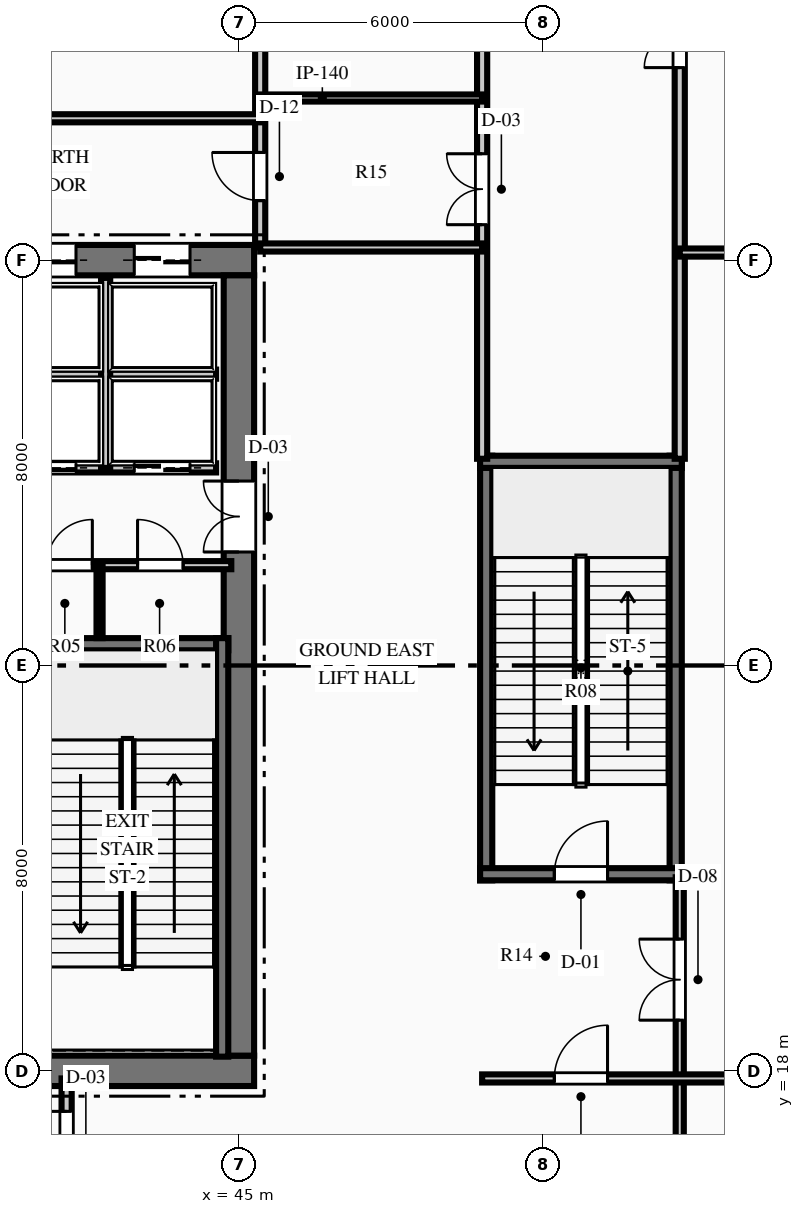
"""IFC4 building model, lengths in metres.
Left out: names, types, materials, properties, quantities, classifications, styles, units other than length and angle.
Written with IfcOpenShell. Run it as: python <this file> out.ifc"""

import sys

from ifc_helpers import new_model, si_unit, direction, frame, frame_2d, origin, place, context, subcontext, project, spatial, rectangle, extrude, element, fill, save


model = new_model("IFC4")
c1 = context("Model", 3, precision=1e-05, world=origin(), true_north=direction((0.0, 1.0)))
c2 = subcontext(c1, "Body", "Model", "MODEL_VIEW")
j1 = project(units=[si_unit("LENGTHUNIT", "METRE"), si_unit("PLANEANGLEUNIT", "RADIAN")], contexts=[c1])
p1 = place(None, origin())
s1 = spatial("IfcSite", under=j1, at=p1, CompositionType="ELEMENT")
p2 = place(p1, origin())
s2 = spatial("IfcBuilding", under=s1, at=p2, CompositionType="ELEMENT")
p3 = place(p2, origin())
s3 = spatial("IfcBuildingStorey", under=s2, at=p3, CompositionType="ELEMENT", Elevation=0.0)
p4 = place(p3, frame((26.7, 18.0, 0.0), z_axis=(0.0, 0.0, 1.0), x_axis=(1.0, 0.0, 0.0)))
e1 = element("IfcWall", 1, at=p4, inside=s3, PredefinedType="SHEAR", context=c2, shape_type="SweptSolid", body=[
    extrude(rectangle(XDim=18.6, YDim=0.6, at=frame_2d((9.3, 0.0))), origin(), (0.0, 0.0, 1.0), 6.0),
])
p5 = place(p4, frame((7.4, 0.0, 0.0)))
e2 = element("IfcOpeningElement", 2, at=p5, cuts=e1, PredefinedType="OPENING", context=c2, shape_type="SweptSolid", body=[
    extrude(rectangle(XDim=1.1, YDim=2.15, at=frame_2d((0.55, 1.075))), frame((0.0, 0.31, 0.0), z_axis=(0.0, -1.0, 0.0), x_axis=(1.0, 0.0, 0.0)), (0.0, 0.0, 1.0), 0.62),
])
p6 = place(p4, frame((10.1, 0.0, 0.0)))
e3 = element("IfcOpeningElement", 3, at=p6, cuts=e1, PredefinedType="OPENING", context=c2, shape_type="SweptSolid", body=[
    extrude(rectangle(XDim=1.1, YDim=2.15, at=frame_2d((0.55, 1.075))), frame((0.0, 0.31, 0.0), z_axis=(0.0, -1.0, 0.0), x_axis=(1.0, 0.0, 0.0)), (0.0, 0.0, 1.0), 0.62),
])
p7 = place(p3, frame((26.7, 34.0, 0.0), z_axis=(0.0, 0.0, 1.0), x_axis=(1.0, 0.0, 0.0)))
e4 = element("IfcWall", 4, at=p7, inside=s3, PredefinedType="SHEAR", context=c2, shape_type="SweptSolid", body=[
    extrude(rectangle(XDim=18.6, YDim=0.6, at=frame_2d((9.3, 0.0))), origin(), (0.0, 0.0, 1.0), 6.0),
])
p8 = place(p7, frame((5.595, 0.0, 0.0)))
e5 = element("IfcOpeningElement", 5, at=p8, cuts=e4, PredefinedType="OPENING", context=c2, shape_type="SweptSolid", body=[
    extrude(rectangle(XDim=1.05, YDim=2.15, at=frame_2d((0.525, 1.075))), frame((0.0, 0.31, 0.0), z_axis=(0.0, -1.0, 0.0), x_axis=(1.0, 0.0, 0.0)), (0.0, 0.0, 1.0), 0.62),
])
p9 = place(p7, frame((1.265, 0.0, 0.0)))
e6 = element("IfcOpeningElement", 6, at=p9, cuts=e4, PredefinedType="OPENING", context=c2, shape_type="SweptSolid", body=[
    extrude(rectangle(XDim=1.1, YDim=2.15, at=frame_2d((0.55, 1.075))), frame((0.0, 0.31, 0.0), z_axis=(0.0, -1.0, 0.0), x_axis=(1.0, 0.0, 0.0)), (0.0, 0.0, 1.0), 0.62),
])
p10 = place(p7, frame((3.515, 0.0, 0.0)))
e7 = element("IfcOpeningElement", 7, at=p10, cuts=e4, PredefinedType="OPENING", context=c2, shape_type="SweptSolid", body=[
    extrude(rectangle(XDim=1.1, YDim=2.15, at=frame_2d((0.55, 1.075))), frame((0.0, 0.31, 0.0), z_axis=(0.0, -1.0, 0.0), x_axis=(1.0, 0.0, 0.0)), (0.0, 0.0, 1.0), 0.62),
])
p11 = place(p7, frame((13.985, 0.0, 0.0)))
e8 = element("IfcOpeningElement", 8, at=p11, cuts=e4, PredefinedType="OPENING", context=c2, shape_type="SweptSolid", body=[
    extrude(rectangle(XDim=1.1, YDim=2.15, at=frame_2d((0.55, 1.075))), frame((0.0, 0.31, 0.0), z_axis=(0.0, -1.0, 0.0), x_axis=(1.0, 0.0, 0.0)), (0.0, 0.0, 1.0), 0.62),
])
p12 = place(p7, frame((16.235, 0.0, 0.0)))
e9 = element("IfcOpeningElement", 9, at=p12, cuts=e4, PredefinedType="OPENING", context=c2, shape_type="SweptSolid", body=[
    extrude(rectangle(XDim=1.1, YDim=2.15, at=frame_2d((0.55, 1.075))), frame((0.0, 0.31, 0.0), z_axis=(0.0, -1.0, 0.0), x_axis=(1.0, 0.0, 0.0)), (0.0, 0.0, 1.0), 0.62),
])
p13 = place(p3, frame((45.0, 18.3, 0.0), z_axis=(0.0, 0.0, 1.0), x_axis=(0.0, 1.0, 0.0)))
e10 = element("IfcWall", 10, at=p13, inside=s3, PredefinedType="SHEAR", context=c2, shape_type="SweptSolid", body=[
    extrude(rectangle(XDim=15.4, YDim=0.6, at=frame_2d((7.7, 0.0))), origin(), (0.0, 0.0, 1.0), 6.0),
])
p14 = place(p13, frame((9.94, 0.0, 0.0)))
e11 = element("IfcOpeningElement", 11, at=p14, cuts=e10, PredefinedType="OPENING", context=c2, shape_type="SweptSolid", body=[
    extrude(rectangle(XDim=1.4, YDim=2.2, at=frame_2d((0.7, 1.1))), frame((0.0, 0.31, 0.0), z_axis=(0.0, -1.0, 0.0), x_axis=(1.0, 0.0, 0.0)), (0.0, 0.0, 1.0), 0.62),
])
p15 = place(p3, frame((40.81, 26.42, 0.0), z_axis=(0.0, 0.0, 1.0), x_axis=(1.0, 0.0, 0.0)))
e12 = element("IfcWall", 12, at=p15, inside=s3, PredefinedType="SHEAR", context=c2, shape_type="SweptSolid", body=[
    extrude(rectangle(XDim=3.98, YDim=0.24, at=frame_2d((1.99, 0.0))), origin(), (0.0, 0.0, 1.0), 6.0),
])
p16 = place(p3, frame((44.67, 18.28, 0.0), z_axis=(0.0, 0.0, 1.0), x_axis=(0.0, 1.0, 0.0)))
e13 = element("IfcWall", 13, at=p16, inside=s3, PredefinedType="SHEAR", context=c2, shape_type="SweptSolid", body=[
    extrude(rectangle(XDim=8.26, YDim=0.24, at=frame_2d((4.13, 0.0))), origin(), (0.0, 0.0, 1.0), 6.0),
])
for number, where, z_axis, x_axis in (
    (14, (49.88, 21.76, 0.0), (0.0, 0.0, 1.0), (0.0, 1.0, 0.0)),
    (15, (53.62, 21.76, 0.0), (0.0, 0.0, 1.0), (0.0, 1.0, 0.0)),
):
    element("IfcWall", number, at=place(p3, frame(where, z_axis=z_axis, x_axis=x_axis)), inside=s3, PredefinedType="SHEAR", context=c2, shape_type="SweptSolid", body=[
        extrude(rectangle(XDim=8.38, YDim=0.24, at=frame_2d((4.19, 0.0))), origin(), (0.0, 0.0, 1.0), 6.0),
    ])
p17 = place(p3, frame((49.76, 21.88, 0.0), z_axis=(0.0, 0.0, 1.0), x_axis=(1.0, 0.0, 0.0)))
e16 = element("IfcWall", 16, at=p17, inside=s3, PredefinedType="SHEAR", context=c2, shape_type="SweptSolid", body=[
    extrude(rectangle(XDim=3.98, YDim=0.24, at=frame_2d((1.99, 0.0))), origin(), (0.0, 0.0, 1.0), 6.0),
])
p18 = place(p17, frame((1.465, 0.0, 0.0)))
e17 = element("IfcOpeningElement", 17, at=p18, cuts=e16, PredefinedType="OPENING", context=c2, shape_type="SweptSolid", body=[
    extrude(rectangle(XDim=1.05, YDim=2.15, at=frame_2d((0.525, 1.075))), frame((0.0, 0.13, 0.0), z_axis=(0.0, -1.0, 0.0), x_axis=(1.0, 0.0, 0.0)), (0.0, 0.0, 1.0), 0.26),
])
p19 = place(p3, frame((49.76, 30.02, 0.0), z_axis=(0.0, 0.0, 1.0), x_axis=(1.0, 0.0, 0.0)))
e18 = element("IfcWall", 18, at=p19, inside=s3, PredefinedType="SHEAR", context=c2, shape_type="SweptSolid", body=[
    extrude(rectangle(XDim=3.98, YDim=0.24, at=frame_2d((1.99, 0.0))), origin(), (0.0, 0.0, 1.0), 6.0),
])
p20 = place(p3, frame((40.8, 27.98, 0.0), z_axis=(0.0, 0.0, 1.0), x_axis=(1.0, 0.0, 0.0)))
e19 = element("IfcWall", 19, at=p20, inside=s3, PredefinedType="PARTITIONING", context=c2, shape_type="SweptSolid", body=[
    extrude(rectangle(XDim=4.05, YDim=0.16, at=frame_2d((2.025, 0.0))), origin(), (0.0, 0.0, 1.0), 5.67),
])
p21 = place(p20, frame((0.407, 0.0, 0.0)))
e20 = element("IfcOpeningElement", 20, at=p21, cuts=e19, PredefinedType="OPENING", context=c2, shape_type="SweptSolid", body=[
    extrude(rectangle(XDim=0.9, YDim=2.15, at=frame_2d((0.45, 1.075))), frame((0.0, 0.09, 0.0), z_axis=(0.0, -1.0, 0.0), x_axis=(1.0, 0.0, 0.0)), (0.0, 0.0, 1.0), 0.18),
])
p22 = place(p20, frame((2.2, 0.0, 0.0)))
e21 = element("IfcOpeningElement", 21, at=p22, cuts=e19, PredefinedType="OPENING", context=c2, shape_type="SweptSolid", body=[
    extrude(rectangle(XDim=0.9, YDim=2.15, at=frame_2d((0.45, 1.075))), frame((0.0, 0.09, 0.0), z_axis=(0.0, -1.0, 0.0), x_axis=(1.0, 0.0, 0.0)), (0.0, 0.0, 1.0), 0.18),
])
p23 = place(p3, frame((42.25, 26.54, 0.0), z_axis=(0.0, 0.0, 1.0), x_axis=(0.0, 1.0, 0.0)))
e22 = element("IfcWall", 22, at=p23, inside=s3, PredefinedType="PARTITIONING", context=c2, shape_type="SweptSolid", body=[
    extrude(rectangle(XDim=1.44, YDim=0.12, at=frame_2d((0.72, 0.0))), origin(), (0.0, 0.0, 1.0), 5.67),
])
p24 = place(p3, frame((40.12, 29.9, 0.0), z_axis=(0.0, 0.0, 1.0), x_axis=(1.0, 0.0, 0.0)))
e23 = element("IfcWall", 23, at=p24, inside=s3, PredefinedType="PARTITIONING", context=c2, shape_type="SweptSolid", body=[
    extrude(rectangle(XDim=4.43, YDim=0.18, at=frame_2d((2.215, 0.0))), origin(), (0.0, 0.0, 1.0), 5.67),
])
p25 = place(p24, frame((0.565, 0.0, 0.0)))
e24 = element("IfcOpeningElement", 24, at=p25, cuts=e23, PredefinedType="OPENING", context=c2, shape_type="SweptSolid", body=[
    extrude(rectangle(XDim=1.1, YDim=2.15, at=frame_2d((0.55, 1.075))), frame((0.0, 0.1, 0.0), z_axis=(0.0, -1.0, 0.0), x_axis=(1.0, 0.0, 0.0)), (0.0, 0.0, 1.0), 0.2),
])
p26 = place(p24, frame((2.815, 0.0, 0.0)))
e25 = element("IfcOpeningElement", 25, at=p26, cuts=e23, PredefinedType="OPENING", context=c2, shape_type="SweptSolid", body=[
    extrude(rectangle(XDim=1.1, YDim=2.15, at=frame_2d((0.55, 1.075))), frame((0.0, 0.1, 0.0), z_axis=(0.0, -1.0, 0.0), x_axis=(1.0, 0.0, 0.0)), (0.0, 0.0, 1.0), 0.2),
])
p27 = place(p3, frame((40.12, 31.75, 0.0), z_axis=(0.0, 0.0, 1.0), x_axis=(1.0, 0.0, 0.0)))
e26 = element("IfcWall", 26, at=p27, inside=s3, PredefinedType="PARTITIONING", context=c2, shape_type="SweptSolid", body=[
    extrude(rectangle(XDim=4.43, YDim=0.18, at=frame_2d((2.215, 0.0))), origin(), (0.0, 0.0, 1.0), 5.67),
])
p28 = place(p3, frame((42.37, 29.9, 0.0), z_axis=(0.0, 0.0, 1.0), x_axis=(0.0, 1.0, 0.0)))
e27 = element("IfcWall", 27, at=p28, inside=s3, PredefinedType="PARTITIONING", context=c2, shape_type="SweptSolid", body=[
    extrude(rectangle(XDim=3.75, YDim=0.18, at=frame_2d((1.875, 0.0))), origin(), (0.0, 0.0, 1.0), 5.67),
])
p29 = place(p3, frame((41.6, 2.55, 0.0), z_axis=(0.0, 0.0, 1.0), x_axis=(0.0, 1.0, 0.0)))
e28 = element("IfcWall", 28, at=p29, inside=s3, PredefinedType="PARTITIONING", context=c2, shape_type="SweptSolid", body=[
    extrude(rectangle(XDim=15.3, YDim=0.2, at=frame_2d((7.65, 0.0))), origin(), (0.0, 0.0, 1.0), 5.67),
])
p30 = place(p29, frame((13.25, 0.0, 0.0)))
e29 = element("IfcOpeningElement", 29, at=p30, cuts=e28, PredefinedType="OPENING", context=c2, shape_type="SweptSolid", body=[
    extrude(rectangle(XDim=1.4, YDim=2.2, at=frame_2d((0.7, 1.1))), frame((0.0, 0.11, 0.0), z_axis=(0.0, -1.0, 0.0), x_axis=(1.0, 0.0, 0.0)), (0.0, 0.0, 1.0), 0.22),
])
p31 = place(p3, frame((49.8, 30.08, 0.0), z_axis=(0.0, 0.0, 1.0), x_axis=(0.0, 1.0, 0.0)))
e30 = element("IfcWall", 30, at=p31, inside=s3, PredefinedType="PARTITIONING", context=c2, shape_type="SweptSolid", body=[
    extrude(rectangle(XDim=19.37, YDim=0.2, at=frame_2d((9.685, 0.0))), origin(), (0.0, 0.0, 1.0), 5.67),
])
p32 = place(p31, frame((4.62, 0.0, 0.0)))
e31 = element("IfcOpeningElement", 31, at=p32, cuts=e30, PredefinedType="OPENING", context=c2, shape_type="SweptSolid", body=[
    extrude(rectangle(XDim=1.4, YDim=2.2, at=frame_2d((0.7, 1.1))), frame((0.0, 0.11, 0.0), z_axis=(0.0, -1.0, 0.0), x_axis=(1.0, 0.0, 0.0)), (0.0, 0.0, 1.0), 0.22),
])
p33 = place(p3, frame((53.7, 30.08, 0.0), z_axis=(0.0, 0.0, 1.0), x_axis=(0.0, 1.0, 0.0)))
e32 = element("IfcWall", 32, at=p33, inside=s3, PredefinedType="PARTITIONING", context=c2, shape_type="SweptSolid", body=[
    extrude(rectangle(XDim=19.37, YDim=0.2, at=frame_2d((9.685, 0.0))), origin(), (0.0, 0.0, 1.0), 5.67),
])
p34 = place(p33, frame((15.595, 0.0, 0.0)))
e33 = element("IfcOpeningElement", 33, at=p34, cuts=e32, PredefinedType="OPENING", context=c2, shape_type="SweptSolid", body=[
    extrude(rectangle(XDim=1.05, YDim=2.15, at=frame_2d((0.525, 1.075))), frame((0.0, 0.11, 0.0), z_axis=(0.0, -1.0, 0.0), x_axis=(1.0, 0.0, 0.0)), (0.0, 0.0, 1.0), 0.22),
])
p35 = place(p33, frame((7.72, 0.0, 0.0)))
e34 = element("IfcOpeningElement", 34, at=p35, cuts=e32, PredefinedType="OPENING", context=c2, shape_type="SweptSolid", body=[
    extrude(rectangle(XDim=1.4, YDim=2.2, at=frame_2d((0.7, 1.1))), frame((0.0, 0.11, 0.0), z_axis=(0.0, -1.0, 0.0), x_axis=(1.0, 0.0, 0.0)), (0.0, 0.0, 1.0), 0.22),
])
p36 = place(p3, frame((53.7, 15.2, 0.0), z_axis=(0.0, 0.0, 1.0), x_axis=(0.0, 1.0, 0.0)))
e35 = element("IfcWall", 35, at=p36, inside=s3, PredefinedType="PARTITIONING", context=c2, shape_type="SweptSolid", body=[
    extrude(rectangle(XDim=2.65, YDim=0.16, at=frame_2d((1.325, 0.0))), origin(), (0.0, 0.0, 1.0), 5.67),
])
p37 = place(p3, frame((53.7, 17.85, 0.0), z_axis=(0.0, 0.0, 1.0), x_axis=(0.0, 1.0, 0.0)))
e36 = element("IfcWall", 36, at=p37, inside=s3, PredefinedType="PARTITIONING", context=c2, shape_type="SweptSolid", body=[
    extrude(rectangle(XDim=3.97, YDim=0.16, at=frame_2d((1.985, 0.0))), origin(), (0.0, 0.0, 1.0), 5.67),
])
p38 = place(p37, frame((1.15, 0.0, 0.0)))
e37 = element("IfcOpeningElement", 37, at=p38, cuts=e36, PredefinedType="OPENING", context=c2, shape_type="SweptSolid", body=[
    extrude(rectangle(XDim=1.6, YDim=2.2, at=frame_2d((0.8, 1.1))), frame((0.0, 0.09, 0.0), z_axis=(0.0, -1.0, 0.0), x_axis=(1.0, 0.0, 0.0)), (0.0, 0.0, 1.0), 0.18),
])
p39 = place(p3, frame((49.8, 17.85, 0.0), z_axis=(0.0, 0.0, 1.0), x_axis=(1.0, 0.0, 0.0)))
e38 = element("IfcWall", 38, at=p39, inside=s3, PredefinedType="PARTITIONING", context=c2, shape_type="SweptSolid", body=[
    extrude(rectangle(XDim=12.35, YDim=0.16, at=frame_2d((6.175, 0.0))), origin(), (0.0, 0.0, 1.0), 4.803),
])
p40 = place(p39, frame((1.425, 0.0, 0.0)))
e39 = element("IfcOpeningElement", 39, at=p40, cuts=e38, PredefinedType="OPENING", context=c2, shape_type="SweptSolid", body=[
    extrude(rectangle(XDim=1.05, YDim=2.15, at=frame_2d((0.525, 1.075))), frame((0.0, 0.09, 0.0), z_axis=(0.0, -1.0, 0.0), x_axis=(1.0, 0.0, 0.0)), (0.0, 0.0, 1.0), 0.18),
])
p41 = place(p3, frame((53.7, 34.15, 0.0), z_axis=(0.0, 0.0, 1.0), x_axis=(1.0, 0.0, 0.0)))
e40 = element("IfcWall", 40, at=p41, inside=s3, PredefinedType="PARTITIONING", context=c2, shape_type="SweptSolid", body=[
    extrude(rectangle(XDim=8.45, YDim=0.16, at=frame_2d((4.225, 0.0))), origin(), (0.0, 0.0, 1.0), 4.803),
])
p42 = place(p3, frame((45.42, 34.25, 0.0), z_axis=(0.0, 0.0, 1.0), x_axis=(0.0, 1.0, 0.0)))
e41 = element("IfcWall", 41, at=p42, inside=s3, PredefinedType="PARTITIONING", context=c2, shape_type="SweptSolid", body=[
    extrude(rectangle(XDim=15.2, YDim=0.2, at=frame_2d((7.6, 0.0))), origin(), (0.0, 0.0, 1.0), 4.803),
])
p43 = place(p42, frame((0.925, 0.0, 0.0)))
e42 = element("IfcOpeningElement", 42, at=p43, cuts=e41, PredefinedType="OPENING", context=c2, shape_type="SweptSolid", body=[
    extrude(rectangle(XDim=0.95, YDim=2.15, at=frame_2d((0.475, 1.075))), frame((0.0, 0.11, 0.0), z_axis=(0.0, -1.0, 0.0), x_axis=(1.0, 0.0, 0.0)), (0.0, 0.0, 1.0), 0.22),
])
p44 = place(p42, frame((4.025, 0.0, 0.0)))
e43 = element("IfcOpeningElement", 43, at=p44, cuts=e41, PredefinedType="OPENING", context=c2, shape_type="SweptSolid", body=[
    extrude(rectangle(XDim=0.95, YDim=2.15, at=frame_2d((0.475, 1.075))), frame((0.0, 0.11, 0.0), z_axis=(0.0, -1.0, 0.0), x_axis=(1.0, 0.0, 0.0)), (0.0, 0.0, 1.0), 0.22),
])
p45 = place(p42, frame((7.0, 0.0, 0.0)))
e44 = element("IfcOpeningElement", 44, at=p45, cuts=e41, PredefinedType="OPENING", context=c2, shape_type="SweptSolid", body=[
    extrude(rectangle(XDim=1.0, YDim=2.15, at=frame_2d((0.5, 1.075))), frame((0.0, 0.11, 0.0), z_axis=(0.0, -1.0, 0.0), x_axis=(1.0, 0.0, 0.0)), (0.0, 0.0, 1.0), 0.22),
])
p46 = place(p3, frame((45.42, 34.25, 0.0), z_axis=(0.0, 0.0, 1.0), x_axis=(1.0, 0.0, 0.0)))
e45 = element("IfcWall", 45, at=p46, inside=s3, PredefinedType="PARTITIONING", context=c2, shape_type="SweptSolid", body=[
    extrude(rectangle(XDim=4.38, YDim=0.16, at=frame_2d((2.19, 0.0))), origin(), (0.0, 0.0, 1.0), 4.803),
])
p47 = place(p3, frame((45.42, 37.2, 0.0), z_axis=(0.0, 0.0, 1.0), x_axis=(1.0, 0.0, 0.0)))
e46 = element("IfcWall", 46, at=p47, inside=s3, PredefinedType="PARTITIONING", context=c2, shape_type="SweptSolid", body=[
    extrude(rectangle(XDim=4.38, YDim=0.14, at=frame_2d((2.19, 0.0))), origin(), (0.0, 0.0, 1.0), 5.67),
])
p48 = place(p3, frame((22.2, 36.8, 0.0), z_axis=(0.0, 0.0, 1.0), x_axis=(1.0, 0.0, 0.0)))
e47 = element("IfcWall", 47, at=p48, inside=s3, PredefinedType="PARTITIONING", context=c2, shape_type="SweptSolid", body=[
    extrude(rectangle(XDim=23.22, YDim=0.16, at=frame_2d((11.61, 0.0))), origin(), (0.0, 0.0, 1.0), 5.67),
])
p49 = place(p48, frame((7.0, 0.0, 0.0)))
e48 = element("IfcOpeningElement", 48, at=p49, cuts=e47, PredefinedType="OPENING", context=c2, shape_type="SweptSolid", body=[
    extrude(rectangle(XDim=1.6, YDim=2.2, at=frame_2d((0.8, 1.1))), frame((0.0, 0.09, 0.0), z_axis=(0.0, -1.0, 0.0), x_axis=(1.0, 0.0, 0.0)), (0.0, 0.0, 1.0), 0.18),
])
p50 = place(p21, origin())
e49 = element("IfcDoor", 49, at=p50, inside=s3, OperationType="SINGLE_SWING_RIGHT", PredefinedType="DOOR", context=c2, shape_type="SweptSolid", body=[
    extrude(rectangle(XDim=0.9, YDim=2.15, at=frame_2d((0.45, 1.075))), frame((0.0, 0.025, 0.0), z_axis=(0.0, -1.0, 0.0), x_axis=(1.0, 0.0, 0.0)), (0.0, 0.0, 1.0), 0.05),
])
fill(e20, e49)
p51 = place(p22, origin())
e50 = element("IfcDoor", 50, at=p51, inside=s3, OperationType="SINGLE_SWING_LEFT", PredefinedType="DOOR", context=c2, shape_type="SweptSolid", body=[
    extrude(rectangle(XDim=0.9, YDim=2.15, at=frame_2d((0.45, 1.075))), frame((0.0, 0.025, 0.0), z_axis=(0.0, -1.0, 0.0), x_axis=(1.0, 0.0, 0.0)), (0.0, 0.0, 1.0), 0.05),
])
fill(e21, e50)
p52 = place(p14, origin())
e51 = element("IfcDoor", 51, at=p52, inside=s3, OperationType="DOUBLE_DOOR_SINGLE_SWING", PredefinedType="DOOR", context=c2, shape_type="SweptSolid", body=[
    extrude(rectangle(XDim=1.4, YDim=2.2, at=frame_2d((0.7, 1.1))), frame((0.0, 0.025, 0.0), z_axis=(0.0, -1.0, 0.0), x_axis=(1.0, 0.0, 0.0)), (0.0, 0.0, 1.0), 0.05),
])
fill(e11, e51)
p53 = place(p18, origin())
e52 = element("IfcDoor", 52, at=p53, inside=s3, OperationType="SINGLE_SWING_RIGHT", PredefinedType="DOOR", context=c2, shape_type="SweptSolid", body=[
    extrude(rectangle(XDim=1.05, YDim=2.15, at=frame_2d((0.525, 1.075))), frame((0.0, 0.025, 0.0), z_axis=(0.0, -1.0, 0.0), x_axis=(1.0, 0.0, 0.0)), (0.0, 0.0, 1.0), 0.05),
])
fill(e17, e52)
p54 = place(p40, origin())
e53 = element("IfcDoor", 53, at=p54, inside=s3, OperationType="SINGLE_SWING_RIGHT", PredefinedType="DOOR", context=c2, shape_type="SweptSolid", body=[
    extrude(rectangle(XDim=1.05, YDim=2.15, at=frame_2d((0.525, 1.075))), frame((0.0, 0.025, 0.0), z_axis=(0.0, -1.0, 0.0), x_axis=(1.0, 0.0, 0.0)), (0.0, 0.0, 1.0), 0.05),
])
fill(e39, e53)
p55 = place(p30, origin())
e54 = element("IfcDoor", 54, at=p55, inside=s3, OperationType="DOUBLE_DOOR_SINGLE_SWING", PredefinedType="DOOR", context=c2, shape_type="SweptSolid", body=[
    extrude(rectangle(XDim=1.4, YDim=2.2, at=frame_2d((0.7, 1.1))), frame((0.0, 0.025, 0.0), z_axis=(0.0, -1.0, 0.0), x_axis=(1.0, 0.0, 0.0)), (0.0, 0.0, 1.0), 0.05),
])
fill(e29, e54)
p56 = place(p32, origin())
e55 = element("IfcDoor", 55, at=p56, inside=s3, OperationType="DOUBLE_DOOR_SINGLE_SWING", PredefinedType="DOOR", context=c2, shape_type="SweptSolid", body=[
    extrude(rectangle(XDim=1.4, YDim=2.2, at=frame_2d((0.7, 1.1))), frame((0.0, 0.025, 0.0), z_axis=(0.0, -1.0, 0.0), x_axis=(1.0, 0.0, 0.0)), (0.0, 0.0, 1.0), 0.05),
])
fill(e31, e55)
p57 = place(p38, origin())
e56 = element("IfcDoor", 56, at=p57, inside=s3, OperationType="DOUBLE_DOOR_SINGLE_SWING", PredefinedType="DOOR", context=c2, shape_type="SweptSolid", body=[
    extrude(rectangle(XDim=1.6, YDim=2.2, at=frame_2d((0.8, 1.1))), frame((0.0, 0.025, 0.0), z_axis=(0.0, -1.0, 0.0), x_axis=(1.0, 0.0, 0.0)), (0.0, 0.0, 1.0), 0.05),
])
fill(e37, e56)
p58 = place(p35, origin())
e57 = element("IfcDoor", 57, at=p58, inside=s3, OperationType="DOUBLE_DOOR_SINGLE_SWING", PredefinedType="DOOR", context=c2, shape_type="SweptSolid", body=[
    extrude(rectangle(XDim=1.4, YDim=2.2, at=frame_2d((0.7, 1.1))), frame((0.0, 0.025, 0.0), z_axis=(0.0, -1.0, 0.0), x_axis=(1.0, 0.0, 0.0)), (0.0, 0.0, 1.0), 0.05),
])
fill(e34, e57)
p59 = place(p43, origin())
e58 = element("IfcDoor", 58, at=p59, inside=s3, OperationType="SINGLE_SWING_RIGHT", PredefinedType="DOOR", context=c2, shape_type="SweptSolid", body=[
    extrude(rectangle(XDim=0.95, YDim=2.15, at=frame_2d((0.475, 1.075))), frame((0.0, 0.025, 0.0), z_axis=(0.0, -1.0, 0.0), x_axis=(1.0, 0.0, 0.0)), (0.0, 0.0, 1.0), 0.05),
])
fill(e42, e58)
p60 = place(p25, origin())
e59 = element("IfcDoor", 59, at=p60, inside=s3, OperationType="SLIDING_TO_LEFT", PredefinedType="DOOR", context=c2, shape_type="SweptSolid", body=[
    extrude(rectangle(XDim=1.1, YDim=2.15, at=frame_2d((0.55, 1.075))), frame((0.0, 0.025, 0.0), z_axis=(0.0, -1.0, 0.0), x_axis=(1.0, 0.0, 0.0)), (0.0, 0.0, 1.0), 0.05),
])
fill(e24, e59)
p61 = place(p26, origin())
e60 = element("IfcDoor", 60, at=p61, inside=s3, OperationType="SLIDING_TO_LEFT", PredefinedType="DOOR", context=c2, shape_type="SweptSolid", body=[
    extrude(rectangle(XDim=1.1, YDim=2.15, at=frame_2d((0.55, 1.075))), frame((0.0, 0.025, 0.0), z_axis=(0.0, -1.0, 0.0), x_axis=(1.0, 0.0, 0.0)), (0.0, 0.0, 1.0), 0.05),
])
fill(e25, e60)
p62 = place(p11, origin())
e61 = element("IfcDoor", 61, at=p62, inside=s3, OperationType="SLIDING_TO_LEFT", PredefinedType="DOOR", context=c2, shape_type="SweptSolid", body=[
    extrude(rectangle(XDim=1.1, YDim=2.15, at=frame_2d((0.55, 1.075))), frame((0.0, 0.025, 0.0), z_axis=(0.0, -1.0, 0.0), x_axis=(1.0, 0.0, 0.0)), (0.0, 0.0, 1.0), 0.05),
])
fill(e8, e61)
p63 = place(p12, origin())
e62 = element("IfcDoor", 62, at=p63, inside=s3, OperationType="SLIDING_TO_LEFT", PredefinedType="DOOR", context=c2, shape_type="SweptSolid", body=[
    extrude(rectangle(XDim=1.1, YDim=2.15, at=frame_2d((0.55, 1.075))), frame((0.0, 0.025, 0.0), z_axis=(0.0, -1.0, 0.0), x_axis=(1.0, 0.0, 0.0)), (0.0, 0.0, 1.0), 0.05),
])
fill(e9, e62)
save(model, sys.argv[1])
